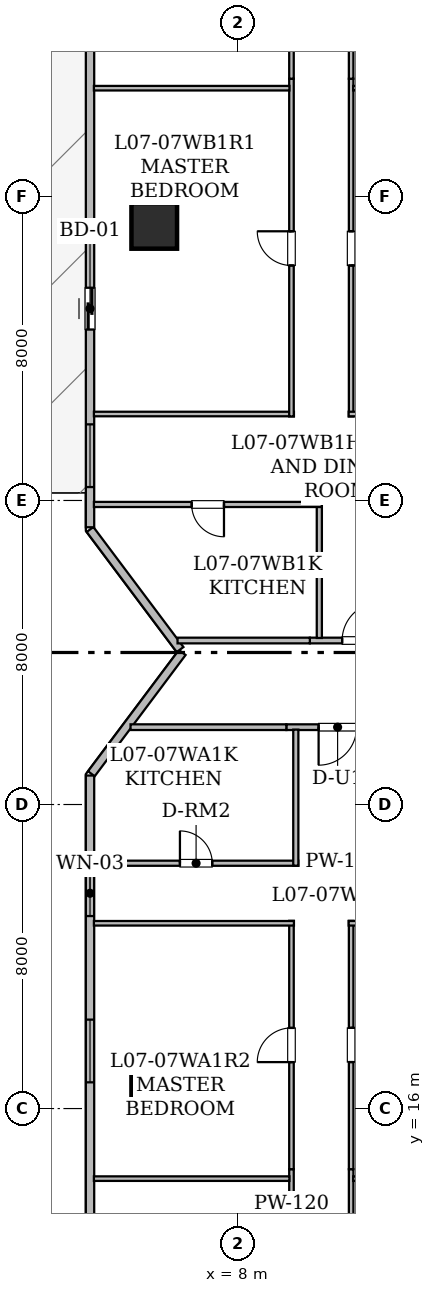
"""IFC4 building model, lengths in metres.
Left out: names, types, materials, properties, quantities, classifications, styles, units other than length and angle.
Written with IfcOpenShell. Run it as: python <this file> out.ifc"""

import sys

from ifc_helpers import new_model, si_unit, direction, frame, frame_2d, origin, origin_2d, place, context, subcontext, project, spatial, rectangle, hollow_rectangle, extrude, element, fill, save


model = new_model("IFC4")
c1 = context("Model", 3, precision=1e-05, world=origin(), true_north=direction((0.0, 1.0)))
c2 = subcontext(c1, "Body", "Model", "MODEL_VIEW")
j1 = project(units=[si_unit("LENGTHUNIT", "METRE"), si_unit("PLANEANGLEUNIT", "RADIAN")], contexts=[c1])
p1 = place(None, origin())
s1 = spatial("IfcSite", under=j1, at=p1, CompositionType="ELEMENT")
p2 = place(p1, origin())
s2 = spatial("IfcBuilding", under=s1, at=p2, CompositionType="ELEMENT")
p3 = place(p2, frame((0.0, 0.0, 33.3)))
s3 = spatial("IfcBuildingStorey", under=s2, at=p3, CompositionType="ELEMENT", Elevation=33.3)
for number, where, z_axis, x_axis in (
    (1, (5.8, 16.775, 0.025), (0.0, 0.0, 1.0), (1.0, 0.0, 0.0)),
    (2, (5.8, 39.225, 0.025), (0.0, 0.0, 1.0), (1.0, 0.0, 0.0)),
):
    element("IfcColumn", number, at=place(p3, frame(where, z_axis=z_axis, x_axis=x_axis)), inside=s3, PredefinedType="COLUMN", context=c2, shape_type="SweptSolid", body=[
        extrude(hollow_rectangle(XDim=1.2, YDim=1.2, WallThickness=0.06, at=origin_2d()), origin(), (0.0, 0.0, 1.0), 3.625),
    ])
p4 = place(p3, frame((4.11, 7.317, 0.0), z_axis=(0.0, 0.0, 1.0), x_axis=(0.0, 1.0, 0.0)))
e3 = element("IfcWall", 3, at=p4, inside=s3, PredefinedType="STANDARD", context=c2, shape_type="SweptSolid", body=[
    extrude(rectangle(XDim=17.446, YDim=0.22, at=frame_2d((8.723, 0.0))), origin(), (0.0, 0.0, 1.0), 3.43),
])
p5 = place(p4, frame((13.748, 0.0, 0.8)))
e4 = element("IfcOpeningElement", 4, at=p5, cuts=e3, PredefinedType="OPENING", context=c2, shape_type="SweptSolid", body=[
    extrude(rectangle(XDim=1.2, YDim=1.5, at=frame_2d((0.6, 0.75))), frame((0.0, 0.12, 0.0), z_axis=(0.0, -1.0, 0.0), x_axis=(1.0, 0.0, 0.0)), (0.0, 0.0, 1.0), 0.24),
])
p6 = place(p4, frame((2.987, 0.0, 0.85)))
e5 = element("IfcOpeningElement", 5, at=p6, cuts=e3, PredefinedType="OPENING", context=c2, shape_type="SweptSolid", body=[
    extrude(rectangle(XDim=1.65, YDim=1.55, at=frame_2d((0.825, 0.775))), frame((0.0, 0.12, 0.0), z_axis=(0.0, -1.0, 0.0), x_axis=(1.0, 0.0, 0.0)), (0.0, 0.0, 1.0), 0.24),
])
p7 = place(p4, frame((9.373, 0.0, 0.85)))
e6 = element("IfcOpeningElement", 6, at=p7, cuts=e3, PredefinedType="OPENING", context=c2, shape_type="SweptSolid", body=[
    extrude(rectangle(XDim=1.65, YDim=1.55, at=frame_2d((0.825, 0.775))), frame((0.0, 0.12, 0.0), z_axis=(0.0, -1.0, 0.0), x_axis=(1.0, 0.0, 0.0)), (0.0, 0.0, 1.0), 0.24),
])
p8 = place(p3, frame((4.145, 24.809, 0.0), z_axis=(0.0, 0.0, 1.0), x_axis=(0.599823674734, 0.800132213592, 0.0)))
e7 = element("IfcWall", 7, at=p8, inside=s3, PredefinedType="STANDARD", context=c2, shape_type="SweptSolid", body=[
    extrude(rectangle(XDim=3.988, YDim=0.22, at=frame_2d((1.994, 0.0))), origin(), (0.0, 0.0, 1.0), 3.43),
])
p9 = place(p3, frame((6.48, 28.077, 0.0), z_axis=(0.0, 0.0, 1.0), x_axis=(-0.599960442794, 0.800029666377, 0.0)))
e8 = element("IfcWall", 8, at=p9, inside=s3, PredefinedType="STANDARD", context=c2, shape_type="SweptSolid", body=[
    extrude(rectangle(XDim=3.95, YDim=0.22, at=frame_2d((1.975, 0.0))), origin(), (0.0, 0.0, 1.0), 3.43),
])
p10 = place(p3, frame((4.11, 31.295, 0.0), z_axis=(0.0, 0.0, 1.0), x_axis=(0.0, 1.0, 0.0)))
e9 = element("IfcWall", 9, at=p10, inside=s3, PredefinedType="STANDARD", context=c2, shape_type="SweptSolid", body=[
    extrude(rectangle(XDim=17.459, YDim=0.22, at=frame_2d((8.729, 0.0))), origin(), (0.0, 0.0, 1.0), 3.43),
])
p11 = place(p10, frame((5.203, 0.0, 0.0)))
e10 = element("IfcOpeningElement", 10, at=p11, cuts=e9, PredefinedType="OPENING", context=c2, shape_type="SweptSolid", body=[
    extrude(rectangle(XDim=1.1, YDim=2.2, at=frame_2d((0.55, 1.1))), frame((0.0, 0.12, 0.0), z_axis=(0.0, -1.0, 0.0), x_axis=(1.0, 0.0, 0.0)), (0.0, 0.0, 1.0), 0.24),
])
p12 = place(p10, frame((1.058, 0.0, 0.85)))
e11 = element("IfcOpeningElement", 11, at=p12, cuts=e9, PredefinedType="OPENING", context=c2, shape_type="SweptSolid", body=[
    extrude(rectangle(XDim=1.65, YDim=1.55, at=frame_2d((0.825, 0.775))), frame((0.0, 0.12, 0.0), z_axis=(0.0, -1.0, 0.0), x_axis=(1.0, 0.0, 0.0)), (0.0, 0.0, 1.0), 0.24),
])
p13 = place(p10, frame((13.288, 0.0, 0.85)))
e12 = element("IfcOpeningElement", 12, at=p13, cuts=e9, PredefinedType="OPENING", context=c2, shape_type="SweptSolid", body=[
    extrude(rectangle(XDim=1.65, YDim=1.55, at=frame_2d((0.825, 0.775))), frame((0.0, 0.12, 0.0), z_axis=(0.0, -1.0, 0.0), x_axis=(1.0, 0.0, 0.0)), (0.0, 0.0, 1.0), 0.24),
])
p14 = place(p3, frame((11.974, 26.035, 0.0), z_axis=(0.0, 0.0, 1.0), x_axis=(-1.0, 0.0, 0.0)))
e13 = element("IfcWall", 13, at=p14, inside=s3, PredefinedType="STANDARD", context=c2, shape_type="SweptSolid", body=[
    extrude(rectangle(XDim=2.698, YDim=0.15, at=frame_2d((1.349, 0.0))), origin(), (0.0, 0.0, 1.0), 3.43),
])
p15 = place(p14, frame((0.849, 0.0, 0.0)))
e14 = element("IfcOpeningElement", 14, at=p15, cuts=e13, PredefinedType="OPENING", context=c2, shape_type="SweptSolid", body=[
    extrude(rectangle(XDim=1.0, YDim=2.15, at=frame_2d((0.5, 1.075))), frame((0.0, 0.085, 0.0), z_axis=(0.0, -1.0, 0.0), x_axis=(1.0, 0.0, 0.0)), (0.0, 0.0, 1.0), 0.17),
])
p16 = place(p3, frame((9.276, 26.035, 0.0), z_axis=(0.0, 0.0, 1.0), x_axis=(-1.0, 0.0, 0.0)))
e15 = element("IfcWall", 15, at=p16, inside=s3, PredefinedType="STANDARD", context=c2, shape_type="SweptSolid", body=[
    extrude(rectangle(XDim=4.1, YDim=0.15, at=frame_2d((2.05, 0.0))), origin(), (0.0, 0.0, 1.0), 2.803),
])
p17 = place(p3, frame((9.895, 28.315, 0.0), z_axis=(0.0, 0.0, 1.0), x_axis=(1.0, 0.0, 0.0)))
e16 = element("IfcWall", 16, at=p17, inside=s3, PredefinedType="STANDARD", context=c2, shape_type="SweptSolid", body=[
    extrude(rectangle(XDim=2.698, YDim=0.15, at=frame_2d((1.349, 0.0))), origin(), (0.0, 0.0, 1.0), 3.43),
])
p18 = place(p17, frame((0.849, 0.0, 0.0)))
e17 = element("IfcOpeningElement", 17, at=p18, cuts=e16, PredefinedType="OPENING", context=c2, shape_type="SweptSolid", body=[
    extrude(rectangle(XDim=1.0, YDim=2.15, at=frame_2d((0.5, 1.075))), frame((0.0, 0.085, 0.0), z_axis=(0.0, -1.0, 0.0), x_axis=(1.0, 0.0, 0.0)), (0.0, 0.0, 1.0), 0.17),
])
p19 = place(p3, frame((6.413, 28.315, 0.0), z_axis=(0.0, 0.0, 1.0), x_axis=(1.0, 0.0, 0.0)))
e18 = element("IfcWall", 18, at=p19, inside=s3, PredefinedType="STANDARD", context=c2, shape_type="SweptSolid", body=[
    extrude(rectangle(XDim=3.482, YDim=0.15, at=frame_2d((1.741, 0.0))), origin(), (0.0, 0.0, 1.0), 3.43),
])
p20 = place(p3, frame((4.212, 22.455, 0.0), z_axis=(0.0, 0.0, 1.0), x_axis=(1.0, 0.0, 0.0)))
e19 = element("IfcWall", 19, at=p20, inside=s3, PredefinedType="PARTITIONING", context=c2, shape_type="SweptSolid", body=[
    extrude(rectangle(XDim=5.378, YDim=0.135, at=frame_2d((2.689, 0.0))), origin(), (0.0, 0.0, 1.0), 2.803),
])
p21 = place(p20, frame((2.264, 0.0, 0.0)))
e20 = element("IfcOpeningElement", 20, at=p21, cuts=e19, PredefinedType="OPENING", context=c2, shape_type="SweptSolid", body=[
    extrude(rectangle(XDim=0.85, YDim=2.1, at=frame_2d((0.425, 1.05))), frame((0.0, 0.077, 0.0), z_axis=(0.0, -1.0, 0.0), x_axis=(1.0, 0.0, 0.0)), (0.0, 0.0, 1.0), 0.155),
])
p22 = place(p3, frame((9.525, 22.39, 0.0), z_axis=(0.0, 0.0, 1.0), x_axis=(0.0, 1.0, 0.0)))
e21 = element("IfcWall", 21, at=p22, inside=s3, PredefinedType="PARTITIONING", context=c2, shape_type="SweptSolid", body=[
    extrude(rectangle(XDim=3.58, YDim=0.135, at=frame_2d((1.79, 0.0))), origin(), (0.0, 0.0, 1.0), 2.957),
])
p23 = place(p3, frame((9.411, 3.212, 0.0), z_axis=(0.0, 0.0, 1.0), x_axis=(0.0, 1.0, 0.0)))
e22 = element("IfcWall", 22, at=p23, inside=s3, PredefinedType="PARTITIONING", context=c2, shape_type="SweptSolid", body=[
    extrude(rectangle(XDim=11.193, YDim=0.12, at=frame_2d((5.597, 0.0))), origin(), (0.0, 0.0, 1.0), 2.647),
])
p24 = place(p23, frame((5.125, 0.0, 0.0)))
e23 = element("IfcOpeningElement", 23, at=p24, cuts=e22, PredefinedType="OPENING", context=c2, shape_type="SweptSolid", body=[
    extrude(rectangle(XDim=0.9, YDim=2.1, at=frame_2d((0.45, 1.05))), frame((0.0, 0.07, 0.0), z_axis=(0.0, -1.0, 0.0), x_axis=(1.0, 0.0, 0.0)), (0.0, 0.0, 1.0), 0.14),
])
p25 = place(p3, frame((9.411, 14.405, 0.0), z_axis=(0.0, 0.0, 1.0), x_axis=(0.0, 1.0, 0.0)))
e24 = element("IfcWall", 24, at=p25, inside=s3, PredefinedType="PARTITIONING", context=c2, shape_type="SweptSolid", body=[
    extrude(rectangle(XDim=6.535, YDim=0.12, at=frame_2d((3.268, 0.0))), origin(), (0.0, 0.0, 1.0), 2.647),
])
p26 = place(p25, frame((2.817, 0.0, 0.0)))
e25 = element("IfcOpeningElement", 25, at=p26, cuts=e24, PredefinedType="OPENING", context=c2, shape_type="SweptSolid", body=[
    extrude(rectangle(XDim=0.9, YDim=2.1, at=frame_2d((0.45, 1.05))), frame((0.0, 0.07, 0.0), z_axis=(0.0, -1.0, 0.0), x_axis=(1.0, 0.0, 0.0)), (0.0, 0.0, 1.0), 0.14),
])
p27 = place(p3, frame((9.476, 20.875, 0.0), z_axis=(0.0, 0.0, 1.0), x_axis=(-1.0, 0.0, 0.0)))
e26 = element("IfcWall", 26, at=p27, inside=s3, PredefinedType="PARTITIONING", context=c2, shape_type="SweptSolid", body=[
    extrude(rectangle(XDim=5.264, YDim=0.12, at=frame_2d((2.632, 0.0))), origin(), (0.0, 0.0, 1.0), 2.803),
])
p28 = place(p3, frame((10.981, 14.405, 0.0), z_axis=(0.0, 0.0, 1.0), x_axis=(0.0, -1.0, 0.0)))
e27 = element("IfcWall", 27, at=p28, inside=s3, PredefinedType="PARTITIONING", context=c2, shape_type="SweptSolid", body=[
    extrude(rectangle(XDim=11.193, YDim=0.12, at=frame_2d((5.597, 0.0))), origin(), (0.0, 0.0, 1.0), 2.647),
])
p29 = place(p28, frame((5.167, 0.0, 0.0)))
e28 = element("IfcOpeningElement", 28, at=p29, cuts=e27, PredefinedType="OPENING", context=c2, shape_type="SweptSolid", body=[
    extrude(rectangle(XDim=0.9, YDim=2.1, at=frame_2d((0.45, 1.05))), frame((0.0, 0.07, 0.0), z_axis=(0.0, -1.0, 0.0), x_axis=(1.0, 0.0, 0.0)), (0.0, 0.0, 1.0), 0.14),
])
p30 = place(p3, frame((10.981, 20.94, 0.0), z_axis=(0.0, 0.0, 1.0), x_axis=(0.0, -1.0, 0.0)))
e29 = element("IfcWall", 29, at=p30, inside=s3, PredefinedType="PARTITIONING", context=c2, shape_type="SweptSolid", body=[
    extrude(rectangle(XDim=6.535, YDim=0.12, at=frame_2d((3.268, 0.0))), origin(), (0.0, 0.0, 1.0), 2.647),
])
p31 = place(p30, frame((2.817, 0.0, 0.0)))
e30 = element("IfcOpeningElement", 30, at=p31, cuts=e29, PredefinedType="OPENING", context=c2, shape_type="SweptSolid", body=[
    extrude(rectangle(XDim=0.9, YDim=2.1, at=frame_2d((0.45, 1.05))), frame((0.0, 0.07, 0.0), z_axis=(0.0, -1.0, 0.0), x_axis=(1.0, 0.0, 0.0)), (0.0, 0.0, 1.0), 0.14),
])
p32 = place(p3, frame((16.281, 20.875, 0.0), z_axis=(0.0, 0.0, 1.0), x_axis=(-1.0, 0.0, 0.0)))
e31 = element("IfcWall", 31, at=p32, inside=s3, PredefinedType="PARTITIONING", context=c2, shape_type="SweptSolid", body=[
    extrude(rectangle(XDim=5.365, YDim=0.12, at=frame_2d((2.683, 0.0))), origin(), (0.0, 0.0, 1.0), 3.43),
])
p33 = place(p3, frame((4.212, 14.156, 0.0), z_axis=(0.0, 0.0, 1.0), x_axis=(1.0, 0.0, 0.0)))
e32 = element("IfcWall", 32, at=p33, inside=s3, PredefinedType="PARTITIONING", context=c2, shape_type="SweptSolid", body=[
    extrude(rectangle(XDim=5.145, YDim=0.12, at=frame_2d((2.573, 0.0))), origin(), (0.0, 0.0, 1.0), 2.803),
])
p34 = place(p3, frame((11.035, 14.156, 0.0), z_axis=(0.0, 0.0, 1.0), x_axis=(1.0, 0.0, 0.0)))
e33 = element("IfcWall", 33, at=p34, inside=s3, PredefinedType="PARTITIONING", context=c2, shape_type="SweptSolid", body=[
    extrude(rectangle(XDim=5.246, YDim=0.12, at=frame_2d((2.623, 0.0))), origin(), (0.0, 0.0, 1.0), 2.647),
])
p35 = place(p3, frame((10.144, 28.382, 0.0), z_axis=(0.0, 0.0, 1.0), x_axis=(0.0, 1.0, 0.0)))
e34 = element("IfcWall", 34, at=p35, inside=s3, PredefinedType="PARTITIONING", context=c2, shape_type="SweptSolid", body=[
    extrude(rectangle(XDim=3.578, YDim=0.135, at=frame_2d((1.789, 0.0))), origin(), (0.0, 0.0, 1.0), 3.43),
])
p36 = place(p3, frame((10.209, 31.895, 0.0), z_axis=(0.0, 0.0, 1.0), x_axis=(-1.0, 0.0, 0.0)))
e35 = element("IfcWall", 35, at=p36, inside=s3, PredefinedType="PARTITIONING", context=c2, shape_type="SweptSolid", body=[
    extrude(rectangle(XDim=5.997, YDim=0.135, at=frame_2d((2.999, 0.0))), origin(), (0.0, 0.0, 1.0), 2.803),
])
p37 = place(p36, frame((2.574, 0.0, 0.0)))
e36 = element("IfcOpeningElement", 36, at=p37, cuts=e35, PredefinedType="OPENING", context=c2, shape_type="SweptSolid", body=[
    extrude(rectangle(XDim=0.85, YDim=2.1, at=frame_2d((0.425, 1.05))), frame((0.0, 0.077, 0.0), z_axis=(0.0, -1.0, 0.0), x_axis=(1.0, 0.0, 0.0)), (0.0, 0.0, 1.0), 0.155),
])
p38 = place(p3, frame((4.212, 34.275, 0.0), z_axis=(0.0, 0.0, 1.0), x_axis=(1.0, 0.0, 0.0)))
e37 = element("IfcWall", 37, at=p38, inside=s3, PredefinedType="PARTITIONING", context=c2, shape_type="SweptSolid", body=[
    extrude(rectangle(XDim=5.264, YDim=0.12, at=frame_2d((2.632, 0.0))), origin(), (0.0, 0.0, 1.0), 2.803),
])
p39 = place(p3, frame((9.411, 34.21, 0.0), z_axis=(0.0, 0.0, 1.0), x_axis=(0.0, 1.0, 0.0)))
e38 = element("IfcWall", 38, at=p39, inside=s3, PredefinedType="PARTITIONING", context=c2, shape_type="SweptSolid", body=[
    extrude(rectangle(XDim=8.887, YDim=0.12, at=frame_2d((4.443, 0.0))), origin(), (0.0, 0.0, 1.0), 2.647),
])
p40 = place(p39, frame((3.973, 0.0, 0.0)))
e39 = element("IfcOpeningElement", 39, at=p40, cuts=e38, PredefinedType="OPENING", context=c2, shape_type="SweptSolid", body=[
    extrude(rectangle(XDim=0.9, YDim=2.1, at=frame_2d((0.45, 1.05))), frame((0.0, 0.07, 0.0), z_axis=(0.0, -1.0, 0.0), x_axis=(1.0, 0.0, 0.0)), (0.0, 0.0, 1.0), 0.14),
])
p41 = place(p3, frame((9.411, 43.097, 0.0), z_axis=(0.0, 0.0, 1.0), x_axis=(0.0, 1.0, 0.0)))
e40 = element("IfcWall", 40, at=p41, inside=s3, PredefinedType="PARTITIONING", context=c2, shape_type="SweptSolid", body=[
    extrude(rectangle(XDim=9.691, YDim=0.12, at=frame_2d((4.846, 0.0))), origin(), (0.0, 0.0, 1.0), 2.647),
])
p42 = place(p41, frame((4.396, 0.0, 0.0)))
e41 = element("IfcOpeningElement", 41, at=p42, cuts=e40, PredefinedType="OPENING", context=c2, shape_type="SweptSolid", body=[
    extrude(rectangle(XDim=0.9, YDim=2.1, at=frame_2d((0.45, 1.05))), frame((0.0, 0.07, 0.0), z_axis=(0.0, -1.0, 0.0), x_axis=(1.0, 0.0, 0.0)), (0.0, 0.0, 1.0), 0.14),
])
p43 = place(p3, frame((10.981, 43.097, 0.0), z_axis=(0.0, 0.0, 1.0), x_axis=(0.0, -1.0, 0.0)))
e42 = element("IfcWall", 42, at=p43, inside=s3, PredefinedType="PARTITIONING", context=c2, shape_type="SweptSolid", body=[
    extrude(rectangle(XDim=8.887, YDim=0.12, at=frame_2d((4.443, 0.0))), origin(), (0.0, 0.0, 1.0), 2.647),
])
p44 = place(p43, frame((4.014, 0.0, 0.0)))
e43 = element("IfcOpeningElement", 43, at=p44, cuts=e42, PredefinedType="OPENING", context=c2, shape_type="SweptSolid", body=[
    extrude(rectangle(XDim=0.9, YDim=2.1, at=frame_2d((0.45, 1.05))), frame((0.0, 0.07, 0.0), z_axis=(0.0, -1.0, 0.0), x_axis=(1.0, 0.0, 0.0)), (0.0, 0.0, 1.0), 0.14),
])
p45 = place(p3, frame((10.916, 34.275, 0.0), z_axis=(0.0, 0.0, 1.0), x_axis=(1.0, 0.0, 0.0)))
e44 = element("IfcWall", 44, at=p45, inside=s3, PredefinedType="PARTITIONING", context=c2, shape_type="SweptSolid", body=[
    extrude(rectangle(XDim=5.365, YDim=0.12, at=frame_2d((2.683, 0.0))), origin(), (0.0, 0.0, 1.0), 3.43),
])
p46 = place(p3, frame((10.981, 52.788, 0.0), z_axis=(0.0, 0.0, 1.0), x_axis=(0.0, -1.0, 0.0)))
e45 = element("IfcWall", 45, at=p46, inside=s3, PredefinedType="PARTITIONING", context=c2, shape_type="SweptSolid", body=[
    extrude(rectangle(XDim=9.691, YDim=0.12, at=frame_2d((4.846, 0.0))), origin(), (0.0, 0.0, 1.0), 2.647),
])
p47 = place(p46, frame((4.396, 0.0, 0.0)))
e46 = element("IfcOpeningElement", 46, at=p47, cuts=e45, PredefinedType="OPENING", context=c2, shape_type="SweptSolid", body=[
    extrude(rectangle(XDim=0.9, YDim=2.1, at=frame_2d((0.45, 1.05))), frame((0.0, 0.07, 0.0), z_axis=(0.0, -1.0, 0.0), x_axis=(1.0, 0.0, 0.0)), (0.0, 0.0, 1.0), 0.14),
])
p48 = place(p3, frame((4.212, 42.848, 0.0), z_axis=(0.0, 0.0, 1.0), x_axis=(1.0, 0.0, 0.0)))
e47 = element("IfcWall", 47, at=p48, inside=s3, PredefinedType="PARTITIONING", context=c2, shape_type="SweptSolid", body=[
    extrude(rectangle(XDim=5.145, YDim=0.12, at=frame_2d((2.573, 0.0))), origin(), (0.0, 0.0, 1.0), 2.803),
])
p49 = place(p3, frame((11.035, 42.848, 0.0), z_axis=(0.0, 0.0, 1.0), x_axis=(1.0, 0.0, 0.0)))
e48 = element("IfcWall", 48, at=p49, inside=s3, PredefinedType="PARTITIONING", context=c2, shape_type="SweptSolid", body=[
    extrude(rectangle(XDim=5.246, YDim=0.12, at=frame_2d((2.623, 0.0))), origin(), (0.0, 0.0, 1.0), 2.647),
])
p50 = place(p11, origin())
e49 = element("IfcDoor", 49, at=p50, inside=s3, OperationType="SLIDING_TO_LEFT", PredefinedType="DOOR", context=c2, shape_type="SweptSolid", body=[
    extrude(rectangle(XDim=1.1, YDim=2.2, at=frame_2d((0.55, 1.1))), frame((0.0, 0.025, 0.0), z_axis=(0.0, -1.0, 0.0), x_axis=(1.0, 0.0, 0.0)), (0.0, 0.0, 1.0), 0.05),
])
fill(e10, e49)
p51 = place(p5, origin())
e50 = element("IfcWindow", 50, at=p51, inside=s3, PartitioningType="SINGLE_PANEL", PredefinedType="WINDOW", context=c2, shape_type="SweptSolid", body=[
    extrude(rectangle(XDim=1.2, YDim=1.5, at=frame_2d((0.6, 0.75))), frame((0.0, 0.03, 0.0), z_axis=(0.0, -1.0, 0.0), x_axis=(1.0, 0.0, 0.0)), (0.0, 0.0, 1.0), 0.06),
])
fill(e4, e50)
p52 = place(p7, origin())
e51 = element("IfcWindow", 51, at=p52, inside=s3, PartitioningType="SINGLE_PANEL", PredefinedType="WINDOW", context=c2, shape_type="SweptSolid", body=[
    extrude(rectangle(XDim=1.65, YDim=1.55, at=frame_2d((0.825, 0.775))), frame((0.0, 0.03, 0.0), z_axis=(0.0, -1.0, 0.0), x_axis=(1.0, 0.0, 0.0)), (0.0, 0.0, 1.0), 0.06),
])
fill(e6, e51)
p53 = place(p12, origin())
e52 = element("IfcWindow", 52, at=p53, inside=s3, PartitioningType="SINGLE_PANEL", PredefinedType="WINDOW", context=c2, shape_type="SweptSolid", body=[
    extrude(rectangle(XDim=1.65, YDim=1.55, at=frame_2d((0.825, 0.775))), frame((0.0, 0.03, 0.0), z_axis=(0.0, -1.0, 0.0), x_axis=(1.0, 0.0, 0.0)), (0.0, 0.0, 1.0), 0.06),
])
fill(e11, e52)
p54 = place(p15, origin())
e53 = element("IfcDoor", 53, at=p54, inside=s3, OperationType="SINGLE_SWING_RIGHT", PredefinedType="DOOR", context=c2, shape_type="SweptSolid", body=[
    extrude(rectangle(XDim=1.0, YDim=2.15, at=frame_2d((0.5, 1.075))), frame((0.0, 0.025, 0.0), z_axis=(0.0, -1.0, 0.0), x_axis=(1.0, 0.0, 0.0)), (0.0, 0.0, 1.0), 0.05),
])
fill(e14, e53)
p55 = place(p18, origin())
e54 = element("IfcDoor", 54, at=p55, inside=s3, OperationType="SINGLE_SWING_RIGHT", PredefinedType="DOOR", context=c2, shape_type="SweptSolid", body=[
    extrude(rectangle(XDim=1.0, YDim=2.15, at=frame_2d((0.5, 1.075))), frame((0.0, 0.025, 0.0), z_axis=(0.0, -1.0, 0.0), x_axis=(1.0, 0.0, 0.0)), (0.0, 0.0, 1.0), 0.05),
])
fill(e17, e54)
p56 = place(p21, origin())
e55 = element("IfcDoor", 55, at=p56, inside=s3, OperationType="SINGLE_SWING_LEFT", PredefinedType="DOOR", context=c2, shape_type="SweptSolid", body=[
    extrude(rectangle(XDim=0.85, YDim=2.1, at=frame_2d((0.425, 1.05))), frame((0.0, 0.025, 0.0), z_axis=(0.0, -1.0, 0.0), x_axis=(1.0, 0.0, 0.0)), (0.0, 0.0, 1.0), 0.05),
])
fill(e20, e55)
p57 = place(p26, origin())
e56 = element("IfcDoor", 56, at=p57, inside=s3, OperationType="SINGLE_SWING_LEFT", PredefinedType="DOOR", context=c2, shape_type="SweptSolid", body=[
    extrude(rectangle(XDim=0.9, YDim=2.1, at=frame_2d((0.45, 1.05))), frame((0.0, 0.025, 0.0), z_axis=(0.0, -1.0, 0.0), x_axis=(1.0, 0.0, 0.0)), (0.0, 0.0, 1.0), 0.05),
])
fill(e25, e56)
p58 = place(p31, origin())
e57 = element("IfcDoor", 57, at=p58, inside=s3, OperationType="SINGLE_SWING_LEFT", PredefinedType="DOOR", context=c2, shape_type="SweptSolid", body=[
    extrude(rectangle(XDim=0.9, YDim=2.1, at=frame_2d((0.45, 1.05))), frame((0.0, 0.025, 0.0), z_axis=(0.0, -1.0, 0.0), x_axis=(1.0, 0.0, 0.0)), (0.0, 0.0, 1.0), 0.05),
])
fill(e30, e57)
p59 = place(p37, origin())
e58 = element("IfcDoor", 58, at=p59, inside=s3, OperationType="SINGLE_SWING_LEFT", PredefinedType="DOOR", context=c2, shape_type="SweptSolid", body=[
    extrude(rectangle(XDim=0.85, YDim=2.1, at=frame_2d((0.425, 1.05))), frame((0.0, 0.025, 0.0), z_axis=(0.0, -1.0, 0.0), x_axis=(1.0, 0.0, 0.0)), (0.0, 0.0, 1.0), 0.05),
])
fill(e36, e58)
p60 = place(p40, origin())
e59 = element("IfcDoor", 59, at=p60, inside=s3, OperationType="SINGLE_SWING_RIGHT", PredefinedType="DOOR", context=c2, shape_type="SweptSolid", body=[
    extrude(rectangle(XDim=0.9, YDim=2.1, at=frame_2d((0.45, 1.05))), frame((0.0, 0.025, 0.0), z_axis=(0.0, -1.0, 0.0), x_axis=(1.0, 0.0, 0.0)), (0.0, 0.0, 1.0), 0.05),
])
fill(e39, e59)
p61 = place(p44, origin())
e60 = element("IfcDoor", 60, at=p61, inside=s3, OperationType="SINGLE_SWING_RIGHT", PredefinedType="DOOR", context=c2, shape_type="SweptSolid", body=[
    extrude(rectangle(XDim=0.9, YDim=2.1, at=frame_2d((0.45, 1.05))), frame((0.0, 0.025, 0.0), z_axis=(0.0, -1.0, 0.0), x_axis=(1.0, 0.0, 0.0)), (0.0, 0.0, 1.0), 0.05),
])
fill(e43, e60)
save(model, sys.argv[1])
